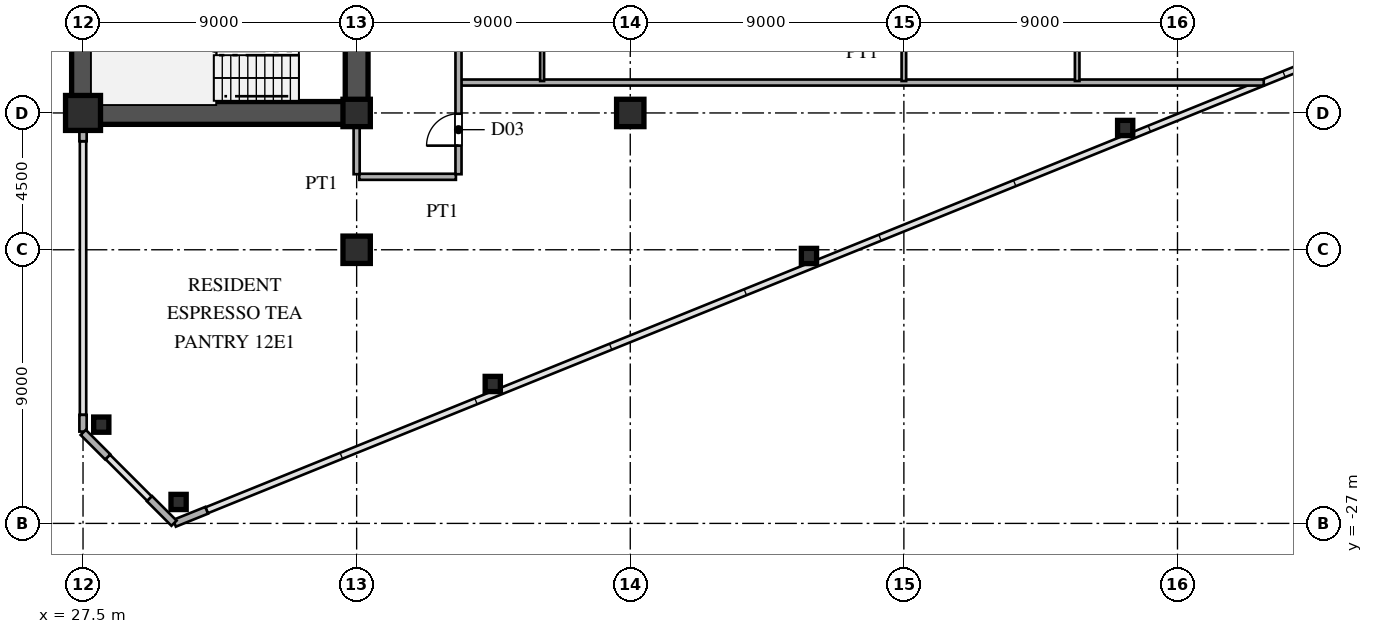
"""IFC4 building model, lengths in metres.
Left out: names, types, materials, properties, quantities, classifications, styles, units other than length and angle.
Written with IfcOpenShell. Run it as: python <this file> out.ifc"""

import sys

from ifc_helpers import new_model, si_unit, direction, frame, frame_2d, origin, origin_2d, place, context, subcontext, project, spatial, rectangle, hollow_rectangle, i_section, extrude, source, transform, mapped, element, fill, save


model = new_model("IFC4")
c1 = context("Model", 3, precision=1e-05, world=origin(), true_north=direction((0.0, 1.0)))
c2 = subcontext(c1, "Body", "Model", "MODEL_VIEW")
j1 = project(units=[si_unit("LENGTHUNIT", "METRE"), si_unit("PLANEANGLEUNIT", "RADIAN")], contexts=[c1])
p1 = place(None, origin())
s1 = spatial("IfcSite", under=j1, at=p1, CompositionType="ELEMENT")
p2 = place(p1, origin())
s2 = spatial("IfcBuilding", under=s1, at=p2, CompositionType="ELEMENT")
p3 = place(p2, frame((0.0, 0.0, 47.7)))
s3 = spatial("IfcBuildingStorey", under=s2, at=p3, CompositionType="ELEMENT", Elevation=47.7)
m1 = source(origin(), c2, "Body", "SweptSolid", [
    extrude(hollow_rectangle(XDim=1.15, YDim=1.15, WallThickness=0.048, at=origin_2d()), origin(), (0.0, 0.0, 1.0), 3.6),
])
p4 = place(p3, frame((27.5, -13.5, 0.0), z_axis=(0.0, 0.0, 1.0), x_axis=(1.0, 0.0, 0.0)))
e1 = element("IfcColumn", 1, at=p4, inside=s3, PredefinedType="COLUMN", context=c2, shape_type="MappedRepresentation", body=[
    mapped(m1, transform((0.0, 0.0, 0.0), scale=1.0)),
])
m2 = source(origin(), c2, "Body", "SweptSolid", [
    extrude(i_section(OverallWidth=0.9, OverallDepth=0.9, WebThickness=0.036, FlangeThickness=0.055, at=origin_2d()), origin(), (0.0, 0.0, 1.0), 3.6),
])
for number, where, z_axis, x_axis in (
    (2, (36.5, -18.0, 0.0), (0.0, 0.0, 1.0), (1.0, 0.0, 0.0)),
    (3, (36.5, -13.5, 0.0), (0.0, 0.0, 1.0), (1.0, 0.0, 0.0)),
    (4, (45.5, -13.5, 0.0), (0.0, 0.0, 1.0), (1.0, 0.0, 0.0)),
):
    element("IfcColumn", number, at=place(p3, frame(where, z_axis=z_axis, x_axis=x_axis)), inside=s3, PredefinedType="COLUMN", context=c2, shape_type="MappedRepresentation", body=[
        mapped(m2, transform((0.0, 0.0, 0.0), scale=1.0)),
    ])
m3 = source(origin(), c2, "Body", "SweptSolid", [
    extrude(hollow_rectangle(XDim=0.5, YDim=0.5, WallThickness=0.02, at=origin_2d()), origin(), (0.0, 0.0, 1.0), 3.6),
])
for number, where, z_axis, x_axis in (
    (5, (30.643, -26.295, 0.0), (0.0, 0.0, 1.0), (1.0, 0.0, 0.0)),
    (6, (28.1, -23.751, 0.0), (0.0, 0.0, 1.0), (1.0, 0.0, 0.0)),
    (7, (40.977, -22.414, 0.0), (0.0, 0.0, 1.0), (1.0, 0.0, 0.0)),
    (8, (51.378, -18.204, 0.0), (0.0, 0.0, 1.0), (1.0, 0.0, 0.0)),
    (9, (61.779, -13.994, 0.0), (0.0, 0.0, 1.0), (1.0, 0.0, 0.0)),
):
    element("IfcColumn", number, at=place(p3, frame(where, z_axis=z_axis, x_axis=x_axis)), inside=s3, PredefinedType="COLUMN", context=c2, shape_type="MappedRepresentation", body=[
        mapped(m3, transform((0.0, 0.0, 0.0), scale=1.0)),
    ])
p5 = place(p3, frame((30.509, -26.996, 0.0), z_axis=(0.0, 0.0, 1.0), x_axis=(0.927007103665, 0.375043770452, 0.0)))
e10 = element("IfcWall", 10, at=p5, inside=s3, PredefinedType="SOLIDWALL", context=c2, shape_type="SweptSolid", body=[
    extrude(rectangle(XDim=1.14, YDim=0.24, at=frame_2d((0.57, 0.0))), origin(), (0.0, 0.0, 1.0), 3.38),
])
p6 = place(p3, frame((27.5, -23.98, 0.0), z_axis=(0.0, 0.0, 1.0), x_axis=(0.0, 1.0, 0.0)))
e11 = element("IfcWall", 11, at=p6, inside=s3, PredefinedType="SOLIDWALL", context=c2, shape_type="SweptSolid", body=[
    extrude(rectangle(XDim=0.55, YDim=0.24, at=frame_2d((0.275, 0.0))), origin(), (0.0, 0.0, 1.0), 3.38),
])
p7 = place(p3, frame((27.5, -14.43, 0.0), z_axis=(0.0, 0.0, 1.0), x_axis=(0.0, 1.0, 0.0)))
e12 = element("IfcWall", 12, at=p7, inside=s3, PredefinedType="SOLIDWALL", context=c2, shape_type="SweptSolid", body=[
    extrude(rectangle(XDim=0.55, YDim=0.24, at=frame_2d((0.275, 0.0))), origin(), (0.0, 0.0, 1.0), 2.88),
])
for number, where, z_axis, x_axis in (
    (13, (27.507, -24.007, 0.0), (0.0, 0.0, 1.0), (0.707, -0.707, 0.0)),
    (14, (29.687, -26.187, 0.0), (0.0, 0.0, 1.0), (0.707, -0.707, 0.0)),
):
    element("IfcWall", number, at=place(p3, frame(where, z_axis=z_axis, x_axis=x_axis)), inside=s3, PredefinedType="SOLIDWALL", context=c2, shape_type="SweptSolid", body=[
        extrude(rectangle(XDim=1.14, YDim=0.24, at=frame_2d((0.57, 0.0))), origin(), (0.0, 0.0, 1.0), 3.38),
    ])
p8 = place(p3, frame((27.5, -13.5, 0.0), z_axis=(0.0, 0.0, 1.0), x_axis=(0.0, 1.0, 0.0)))
e15 = element("IfcWall", 15, at=p8, inside=s3, PredefinedType="SHEAR", context=c2, shape_type="SweptSolid", body=[
    extrude(rectangle(XDim=12.2, YDim=0.75, at=frame_2d((6.1, 0.0))), origin(), (0.0, 0.0, 1.0), 3.38),
])
p9 = place(p3, frame((27.5, -13.5, 0.0), z_axis=(0.0, 0.0, 1.0), x_axis=(1.0, 0.0, 0.0)))
e16 = element("IfcWall", 16, at=p9, inside=s3, PredefinedType="SHEAR", context=c2, shape_type="SweptSolid", body=[
    extrude(rectangle(XDim=9.0, YDim=0.75, at=frame_2d((4.5, 0.0))), origin(), (0.0, 0.0, 1.0), 3.38),
])
p10 = place(p3, frame((36.5, -13.65, 0.0), z_axis=(0.0, 0.0, 1.0), x_axis=(0.0, 1.0, 0.0)))
e17 = element("IfcWall", 17, at=p10, inside=s3, PredefinedType="SHEAR", context=c2, shape_type="SweptSolid", body=[
    extrude(rectangle(XDim=7.15, YDim=0.75, at=frame_2d((3.575, 0.0))), origin(), (0.0, 0.0, 1.0), 3.38),
])
p11 = place(p10, frame((4.675, 0.0, 0.0)))
e18 = element("IfcOpeningElement", 18, at=p11, cuts=e17, PredefinedType="OPENING", context=c2, shape_type="SweptSolid", body=[
    extrude(rectangle(XDim=1.15, YDim=2.2, at=frame_2d((0.575, 1.1))), frame((0.0, 0.385, 0.0), z_axis=(0.0, -1.0, 0.0), x_axis=(1.0, 0.0, 0.0)), (0.0, 0.0, 1.0), 0.77),
])
p12 = place(p3, frame((36.585, -15.6, 0.0), z_axis=(0.0, 0.0, 1.0), x_axis=(1.0, 0.0, 0.0)))
e19 = element("IfcWall", 19, at=p12, inside=s3, PredefinedType="PARTITIONING", context=c2, shape_type="SweptSolid", body=[
    extrude(rectangle(XDim=3.18, YDim=0.2, at=frame_2d((1.59, 0.0))), origin(), (0.0, 0.0, 1.0), 3.38),
])
p13 = place(p3, frame((39.93, -12.5, 0.0), z_axis=(0.0, 0.0, 1.0), x_axis=(1.0, 0.0, 0.0)))
e20 = element("IfcWall", 20, at=p13, inside=s3, PredefinedType="PARTITIONING", context=c2, shape_type="SweptSolid", body=[
    extrude(rectangle(XDim=26.407, YDim=0.2, at=frame_2d((13.204, 0.0))), origin(), (0.0, 0.0, 1.0), 3.38),
])
p14 = place(p3, frame((36.5, -15.515, 0.0), z_axis=(0.0, 0.0, 1.0), x_axis=(0.0, 1.0, 0.0)))
e21 = element("IfcWall", 21, at=p14, inside=s3, PredefinedType="PARTITIONING", context=c2, shape_type="SweptSolid", body=[
    extrude(rectangle(XDim=1.635, YDim=0.2, at=frame_2d((0.817, 0.0))), origin(), (0.0, 0.0, 1.0), 2.68),
])
p15 = place(p3, frame((39.85, -15.515, 0.0), z_axis=(0.0, 0.0, 1.0), x_axis=(0.0, 1.0, 0.0)))
e22 = element("IfcWall", 22, at=p15, inside=s3, PredefinedType="PARTITIONING", context=c2, shape_type="SweptSolid", body=[
    extrude(rectangle(XDim=31.03, YDim=0.2, at=frame_2d((15.515, 0.0))), origin(), (0.0, 0.0, 1.0), 3.38),
])
p16 = place(p15, frame((0.94, 0.0, 0.0)))
e23 = element("IfcOpeningElement", 23, at=p16, cuts=e22, PredefinedType="OPENING", context=c2, shape_type="SweptSolid", body=[
    extrude(rectangle(XDim=1.05, YDim=2.25, at=frame_2d((0.525, 1.125))), frame((0.0, 0.11, 0.0), z_axis=(0.0, -1.0, 0.0), x_axis=(1.0, 0.0, 0.0)), (0.0, 0.0, 1.0), 0.22),
])
p17 = place(p15, frame((9.28, 0.0, 0.0)))
e24 = element("IfcOpeningElement", 24, at=p17, cuts=e22, PredefinedType="OPENING", context=c2, shape_type="SweptSolid", body=[
    extrude(rectangle(XDim=1.05, YDim=2.25, at=frame_2d((0.525, 1.125))), frame((0.0, 0.11, 0.0), z_axis=(0.0, -1.0, 0.0), x_axis=(1.0, 0.0, 0.0)), (0.0, 0.0, 1.0), 0.22),
])
p18 = place(p15, frame((21.825, 0.0, 0.0)))
e25 = element("IfcOpeningElement", 25, at=p18, cuts=e22, PredefinedType="OPENING", context=c2, shape_type="SweptSolid", body=[
    extrude(rectangle(XDim=1.05, YDim=2.25, at=frame_2d((0.525, 1.125))), frame((0.0, 0.11, 0.0), z_axis=(0.0, -1.0, 0.0), x_axis=(1.0, 0.0, 0.0)), (0.0, 0.0, 1.0), 0.22),
])
p19 = place(p15, frame((29.04, 0.0, 0.0)))
e26 = element("IfcOpeningElement", 26, at=p19, cuts=e22, PredefinedType="OPENING", context=c2, shape_type="SweptSolid", body=[
    extrude(rectangle(XDim=1.05, YDim=2.25, at=frame_2d((0.525, 1.125))), frame((0.0, 0.11, 0.0), z_axis=(0.0, -1.0, 0.0), x_axis=(1.0, 0.0, 0.0)), (0.0, 0.0, 1.0), 0.22),
])
p20 = place(p3, frame((42.6, -12.45, 0.0), z_axis=(0.0, 0.0, 1.0), x_axis=(0.0, 1.0, 0.0)))
e27 = element("IfcWall", 27, at=p20, inside=s3, PredefinedType="PARTITIONING", context=c2, shape_type="SweptSolid", body=[
    extrude(rectangle(XDim=9.233, YDim=0.13, at=frame_2d((4.616, 0.0))), origin(), (0.0, 0.0, 1.0), 3.38),
])
p21 = place(p20, frame((6.475, 0.0, 0.0)))
e28 = element("IfcOpeningElement", 28, at=p21, cuts=e27, PredefinedType="OPENING", context=c2, shape_type="SweptSolid", body=[
    extrude(rectangle(XDim=0.95, YDim=2.15, at=frame_2d((0.475, 1.075))), frame((0.0, 0.075, 0.0), z_axis=(0.0, -1.0, 0.0), x_axis=(1.0, 0.0, 0.0)), (0.0, 0.0, 1.0), 0.15),
])
p22 = place(p3, frame((54.5, -12.45, 0.0), z_axis=(0.0, 0.0, 1.0), x_axis=(0.0, 1.0, 0.0)))
e29 = element("IfcWall", 29, at=p22, inside=s3, PredefinedType="PARTITIONING", context=c2, shape_type="SweptSolid", body=[
    extrude(rectangle(XDim=24.9, YDim=0.15, at=frame_2d((12.45, 0.0))), origin(), (0.0, 0.0, 1.0), 2.68),
])
p23 = place(p22, frame((6.475, 0.0, 0.0)))
e30 = element("IfcOpeningElement", 30, at=p23, cuts=e29, PredefinedType="OPENING", context=c2, shape_type="SweptSolid", body=[
    extrude(rectangle(XDim=0.95, YDim=2.15, at=frame_2d((0.475, 1.075))), frame((0.0, 0.085, 0.0), z_axis=(0.0, -1.0, 0.0), x_axis=(1.0, 0.0, 0.0)), (0.0, 0.0, 1.0), 0.17),
])
p24 = place(p22, frame((18.975, 0.0, 0.0)))
e31 = element("IfcOpeningElement", 31, at=p24, cuts=e29, PredefinedType="OPENING", context=c2, shape_type="SweptSolid", body=[
    extrude(rectangle(XDim=0.95, YDim=2.15, at=frame_2d((0.475, 1.075))), frame((0.0, 0.085, 0.0), z_axis=(0.0, -1.0, 0.0), x_axis=(1.0, 0.0, 0.0)), (0.0, 0.0, 1.0), 0.17),
])
p25 = place(p3, frame((60.2, -12.45, 0.0), z_axis=(0.0, 0.0, 1.0), x_axis=(0.0, 1.0, 0.0)))
e32 = element("IfcWall", 32, at=p25, inside=s3, PredefinedType="PARTITIONING", context=c2, shape_type="SweptSolid", body=[
    extrude(rectangle(XDim=24.9, YDim=0.15, at=frame_2d((12.45, 0.0))), origin(), (0.0, 0.0, 1.0), 3.38),
])
p26 = place(p25, frame((1.808, 0.0, 0.0)))
e33 = element("IfcOpeningElement", 33, at=p26, cuts=e32, PredefinedType="OPENING", context=c2, shape_type="SweptSolid", body=[
    extrude(rectangle(XDim=0.95, YDim=2.15, at=frame_2d((0.475, 1.075))), frame((0.0, 0.085, 0.0), z_axis=(0.0, -1.0, 0.0), x_axis=(1.0, 0.0, 0.0)), (0.0, 0.0, 1.0), 0.17),
])
p27 = place(p25, frame((6.475, 0.0, 0.0)))
e34 = element("IfcOpeningElement", 34, at=p27, cuts=e32, PredefinedType="OPENING", context=c2, shape_type="SweptSolid", body=[
    extrude(rectangle(XDim=0.95, YDim=2.15, at=frame_2d((0.475, 1.075))), frame((0.0, 0.085, 0.0), z_axis=(0.0, -1.0, 0.0), x_axis=(1.0, 0.0, 0.0)), (0.0, 0.0, 1.0), 0.17),
])
p28 = place(p25, frame((11.142, 0.0, 0.0)))
e35 = element("IfcOpeningElement", 35, at=p28, cuts=e32, PredefinedType="OPENING", context=c2, shape_type="SweptSolid", body=[
    extrude(rectangle(XDim=0.95, YDim=2.15, at=frame_2d((0.475, 1.075))), frame((0.0, 0.085, 0.0), z_axis=(0.0, -1.0, 0.0), x_axis=(1.0, 0.0, 0.0)), (0.0, 0.0, 1.0), 0.17),
])
p29 = place(p25, frame((15.308, 0.0, 0.0)))
e36 = element("IfcOpeningElement", 36, at=p29, cuts=e32, PredefinedType="OPENING", context=c2, shape_type="SweptSolid", body=[
    extrude(rectangle(XDim=0.95, YDim=2.15, at=frame_2d((0.475, 1.075))), frame((0.0, 0.085, 0.0), z_axis=(0.0, -1.0, 0.0), x_axis=(1.0, 0.0, 0.0)), (0.0, 0.0, 1.0), 0.17),
])
p30 = place(p25, frame((18.975, 0.0, 0.0)))
e37 = element("IfcOpeningElement", 37, at=p30, cuts=e32, PredefinedType="OPENING", context=c2, shape_type="SweptSolid", body=[
    extrude(rectangle(XDim=0.95, YDim=2.15, at=frame_2d((0.475, 1.075))), frame((0.0, 0.085, 0.0), z_axis=(0.0, -1.0, 0.0), x_axis=(1.0, 0.0, 0.0)), (0.0, 0.0, 1.0), 0.17),
])
m4 = source(origin(), c2, "Body", "SweptSolid", [
    extrude(rectangle(XDim=1.05, YDim=2.25, at=frame_2d((0.525, 1.125))), frame((0.0, 0.025, 0.0), z_axis=(0.0, -1.0, 0.0), x_axis=(1.0, 0.0, 0.0)), (0.0, 0.0, 1.0), 0.05),
])
p31 = place(p16, origin())
e38 = element("IfcDoor", 38, at=p31, inside=s3, OperationType="SINGLE_SWING_LEFT", PredefinedType="DOOR", context=c2, shape_type="MappedRepresentation", body=[
    mapped(m4, transform((0.0, 0.0, 0.0), scale=1.0)),
])
fill(e23, e38)
save(model, sys.argv[1])
